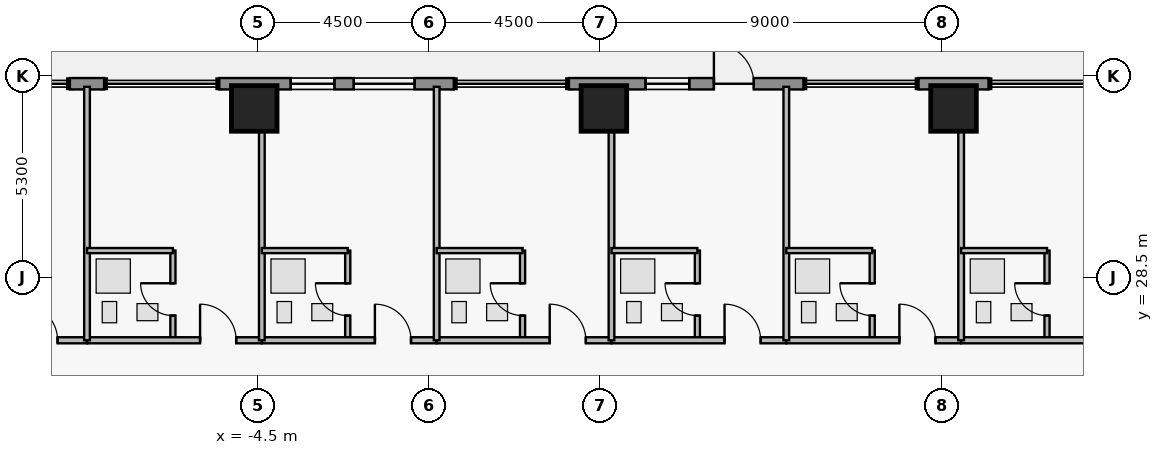
"""IFC4 building model, lengths in metres.
Left out: names, types, materials, properties, quantities, classifications, styles, units other than length and angle.
Written with IfcOpenShell. Run it as: python <this file> out.ifc"""

import sys

from ifc_helpers import new_model, si_unit, direction, frame, frame_2d, origin, origin_2d, place, context, subcontext, project, spatial, rectangle, extrude, element, fill, save


model = new_model("IFC4")
c1 = context("Model", 3, precision=1e-05, world=origin(), true_north=direction((0.0, 1.0)))
c2 = subcontext(c1, "Body", "Model", "MODEL_VIEW")
j1 = project(units=[si_unit("LENGTHUNIT", "METRE"), si_unit("PLANEANGLEUNIT", "RADIAN")], contexts=[c1])
p1 = place(None, origin())
s1 = spatial("IfcSite", under=j1, at=p1, CompositionType="ELEMENT")
p2 = place(p1, origin())
s2 = spatial("IfcBuilding", under=s1, at=p2, CompositionType="ELEMENT")
p3 = place(p2, frame((0.0, 0.0, 226.15)))
s3 = spatial("IfcBuildingStorey", under=s2, at=p3, CompositionType="ELEMENT", Elevation=226.15)
for number, where, z_axis, x_axis in (
    (1, (-4.6, 32.95, 0.0), (0.0, 0.0, 1.0), (1.0, 0.0, 0.0)),
    (2, (4.6, 32.95, 0.0), (0.0, 0.0, 1.0), (1.0, 0.0, 0.0)),
    (3, (13.8, 32.95, 0.0), (0.0, 0.0, 1.0), (1.0, 0.0, 0.0)),
):
    element("IfcColumn", number, at=place(p3, frame(where, z_axis=z_axis, x_axis=x_axis)), inside=s3, PredefinedType="COLUMN", context=c2, shape_type="SweptSolid", body=[
        extrude(rectangle(XDim=1.2, YDim=1.2, at=origin_2d()), origin(), (0.0, 0.0, 1.0), 3.75),
    ])
p4 = place(p3, frame((-9.45, 33.6, 0.0), z_axis=(0.0, 0.0, 1.0), x_axis=(1.0, 0.0, 0.0)))
e4 = element("IfcWall", 4, at=p4, inside=s3, PredefinedType="STANDARD", context=c2, shape_type="SweptSolid", body=[
    extrude(rectangle(XDim=0.9, YDim=0.3, at=frame_2d((0.45, 0.0))), origin(), (0.0, 0.0, 1.0), 3.53),
])
p5 = place(p3, frame((-5.52, 33.6, 0.0), z_axis=(0.0, 0.0, 1.0), x_axis=(1.0, 0.0, 0.0)))
e5 = element("IfcWall", 5, at=p5, inside=s3, PredefinedType="STANDARD", context=c2, shape_type="SweptSolid", body=[
    extrude(rectangle(XDim=6.17, YDim=0.3, at=frame_2d((3.085, 0.0))), origin(), (0.0, 0.0, 1.0), 3.53),
])
p6 = place(p5, frame((3.54, 0.0, 0.85)))
e6 = element("IfcOpeningElement", 6, at=p6, cuts=e5, PredefinedType="OPENING", context=c2, shape_type="SweptSolid", body=[
    extrude(rectangle(XDim=1.6, YDim=1.8, at=frame_2d((0.8, 0.9))), frame((0.0, 0.16, 0.0), z_axis=(0.0, -1.0, 0.0), x_axis=(1.0, 0.0, 0.0)), (0.0, 0.0, 1.0), 0.32),
])
p7 = place(p5, frame((1.88, 0.0, 0.95)))
e7 = element("IfcOpeningElement", 7, at=p7, cuts=e5, PredefinedType="OPENING", context=c2, shape_type="SweptSolid", body=[
    extrude(rectangle(XDim=1.15, YDim=1.55, at=frame_2d((0.575, 0.775))), frame((0.0, 0.16, 0.0), z_axis=(0.0, -1.0, 0.0), x_axis=(1.0, 0.0, 0.0)), (0.0, 0.0, 1.0), 0.32),
])
p8 = place(p3, frame((3.68, 33.6, 0.0), z_axis=(0.0, 0.0, 1.0), x_axis=(1.0, 0.0, 0.0)))
e8 = element("IfcWall", 8, at=p8, inside=s3, PredefinedType="STANDARD", context=c2, shape_type="SweptSolid", body=[
    extrude(rectangle(XDim=6.17, YDim=0.3, at=frame_2d((3.085, 0.0))), origin(), (0.0, 0.0, 1.0), 3.53),
])
p9 = place(p8, frame((3.815, 0.0, 0.0)))
e9 = element("IfcOpeningElement", 9, at=p9, cuts=e8, PredefinedType="OPENING", context=c2, shape_type="SweptSolid", body=[
    extrude(rectangle(XDim=1.05, YDim=2.2, at=frame_2d((0.525, 1.1))), frame((0.0, 0.16, 0.0), z_axis=(0.0, -1.0, 0.0), x_axis=(1.0, 0.0, 0.0)), (0.0, 0.0, 1.0), 0.32),
])
p10 = place(p8, frame((2.018, 0.0, 0.95)))
e10 = element("IfcOpeningElement", 10, at=p10, cuts=e8, PredefinedType="OPENING", context=c2, shape_type="SweptSolid", body=[
    extrude(rectangle(XDim=1.15, YDim=1.55, at=frame_2d((0.575, 0.775))), frame((0.0, 0.16, 0.0), z_axis=(0.0, -1.0, 0.0), x_axis=(1.0, 0.0, 0.0)), (0.0, 0.0, 1.0), 0.32),
])
p11 = place(p3, frame((12.88, 33.6, 0.0), z_axis=(0.0, 0.0, 1.0), x_axis=(1.0, 0.0, 0.0)))
e11 = element("IfcWall", 11, at=p11, inside=s3, PredefinedType="STANDARD", context=c2, shape_type="SweptSolid", body=[
    extrude(rectangle(XDim=1.84, YDim=0.3, at=frame_2d((0.92, 0.0))), origin(), (0.0, 0.0, 1.0), 3.53),
])
p12 = place(p3, frame((-13.8, 26.85, 0.0), z_axis=(0.0, 0.0, 1.0), x_axis=(1.0, 0.0, 0.0)))
e12 = element("IfcWall", 12, at=p12, inside=s3, PredefinedType="PARTITIONING", context=c2, shape_type="SweptSolid", body=[
    extrude(rectangle(XDim=4.8, YDim=0.16, at=frame_2d((2.4, 0.0))), origin(), (0.0, 0.0, 1.0), 3.53),
])
p13 = place(p12, frame((3.075, 0.0, 0.0)))
e13 = element("IfcOpeningElement", 13, at=p13, cuts=e12, PredefinedType="OPENING", context=c2, shape_type="SweptSolid", body=[
    extrude(rectangle(XDim=0.95, YDim=2.15, at=frame_2d((0.475, 1.075))), frame((0.0, 0.09, 0.0), z_axis=(0.0, -1.0, 0.0), x_axis=(1.0, 0.0, 0.0)), (0.0, 0.0, 1.0), 0.18),
])
p14 = place(p3, frame((-6.74, 26.85, 0.0), z_axis=(0.0, 0.0, 1.0), x_axis=(0.0, 1.0, 0.0)))
e14 = element("IfcWall", 14, at=p14, inside=s3, PredefinedType="PLUMBINGWALL", context=c2, shape_type="SweptSolid", body=[
    extrude(rectangle(XDim=2.36, YDim=0.135, at=frame_2d((1.18, 0.0))), origin(), (0.0, 0.0, 1.0), 3.53),
])
p15 = place(p14, frame((0.65, 0.0, 0.0)))
e15 = element("IfcOpeningElement", 15, at=p15, cuts=e14, PredefinedType="OPENING", context=c2, shape_type="SweptSolid", body=[
    extrude(rectangle(XDim=0.85, YDim=2.1, at=frame_2d((0.425, 1.05))), frame((0.0, 0.077, 0.0), z_axis=(0.0, -1.0, 0.0), x_axis=(1.0, 0.0, 0.0)), (0.0, 0.0, 1.0), 0.155),
])
p16 = place(p3, frame((-9.0, 26.85, 0.0), z_axis=(0.0, 0.0, 1.0), x_axis=(1.0, 0.0, 0.0)))
e16 = element("IfcWall", 16, at=p16, inside=s3, PredefinedType="PARTITIONING", context=c2, shape_type="SweptSolid", body=[
    extrude(rectangle(XDim=4.6, YDim=0.16, at=frame_2d((2.3, 0.0))), origin(), (0.0, 0.0, 1.0), 3.53),
])
p17 = place(p16, frame((2.975, 0.0, 0.0)))
e17 = element("IfcOpeningElement", 17, at=p17, cuts=e16, PredefinedType="OPENING", context=c2, shape_type="SweptSolid", body=[
    extrude(rectangle(XDim=0.95, YDim=2.15, at=frame_2d((0.475, 1.075))), frame((0.0, 0.09, 0.0), z_axis=(0.0, -1.0, 0.0), x_axis=(1.0, 0.0, 0.0)), (0.0, 0.0, 1.0), 0.18),
])
p18 = place(p3, frame((-2.14, 26.85, 0.0), z_axis=(0.0, 0.0, 1.0), x_axis=(0.0, 1.0, 0.0)))
e18 = element("IfcWall", 18, at=p18, inside=s3, PredefinedType="PLUMBINGWALL", context=c2, shape_type="SweptSolid", body=[
    extrude(rectangle(XDim=2.36, YDim=0.135, at=frame_2d((1.18, 0.0))), origin(), (0.0, 0.0, 1.0), 3.53),
])
p19 = place(p18, frame((0.65, 0.0, 0.0)))
e19 = element("IfcOpeningElement", 19, at=p19, cuts=e18, PredefinedType="OPENING", context=c2, shape_type="SweptSolid", body=[
    extrude(rectangle(XDim=0.85, YDim=2.1, at=frame_2d((0.425, 1.05))), frame((0.0, 0.077, 0.0), z_axis=(0.0, -1.0, 0.0), x_axis=(1.0, 0.0, 0.0)), (0.0, 0.0, 1.0), 0.155),
])
p20 = place(p3, frame((-4.4, 26.85, 0.0), z_axis=(0.0, 0.0, 1.0), x_axis=(1.0, 0.0, 0.0)))
e20 = element("IfcWall", 20, at=p20, inside=s3, PredefinedType="PARTITIONING", context=c2, shape_type="SweptSolid", body=[
    extrude(rectangle(XDim=4.6, YDim=0.16, at=frame_2d((2.3, 0.0))), origin(), (0.0, 0.0, 1.0), 3.53),
])
p21 = place(p20, frame((2.975, 0.0, 0.0)))
e21 = element("IfcOpeningElement", 21, at=p21, cuts=e20, PredefinedType="OPENING", context=c2, shape_type="SweptSolid", body=[
    extrude(rectangle(XDim=0.95, YDim=2.15, at=frame_2d((0.475, 1.075))), frame((0.0, 0.09, 0.0), z_axis=(0.0, -1.0, 0.0), x_axis=(1.0, 0.0, 0.0)), (0.0, 0.0, 1.0), 0.18),
])
p22 = place(p3, frame((2.46, 26.85, 0.0), z_axis=(0.0, 0.0, 1.0), x_axis=(0.0, 1.0, 0.0)))
e22 = element("IfcWall", 22, at=p22, inside=s3, PredefinedType="PLUMBINGWALL", context=c2, shape_type="SweptSolid", body=[
    extrude(rectangle(XDim=2.36, YDim=0.135, at=frame_2d((1.18, 0.0))), origin(), (0.0, 0.0, 1.0), 3.53),
])
p23 = place(p22, frame((0.65, 0.0, 0.0)))
e23 = element("IfcOpeningElement", 23, at=p23, cuts=e22, PredefinedType="OPENING", context=c2, shape_type="SweptSolid", body=[
    extrude(rectangle(XDim=0.85, YDim=2.1, at=frame_2d((0.425, 1.05))), frame((0.0, 0.077, 0.0), z_axis=(0.0, -1.0, 0.0), x_axis=(1.0, 0.0, 0.0)), (0.0, 0.0, 1.0), 0.155),
])
p24 = place(p3, frame((0.2, 26.85, 0.0), z_axis=(0.0, 0.0, 1.0), x_axis=(1.0, 0.0, 0.0)))
e24 = element("IfcWall", 24, at=p24, inside=s3, PredefinedType="PARTITIONING", context=c2, shape_type="SweptSolid", body=[
    extrude(rectangle(XDim=4.6, YDim=0.16, at=frame_2d((2.3, 0.0))), origin(), (0.0, 0.0, 1.0), 3.53),
])
p25 = place(p24, frame((2.975, 0.0, 0.0)))
e25 = element("IfcOpeningElement", 25, at=p25, cuts=e24, PredefinedType="OPENING", context=c2, shape_type="SweptSolid", body=[
    extrude(rectangle(XDim=0.95, YDim=2.15, at=frame_2d((0.475, 1.075))), frame((0.0, 0.09, 0.0), z_axis=(0.0, -1.0, 0.0), x_axis=(1.0, 0.0, 0.0)), (0.0, 0.0, 1.0), 0.18),
])
p26 = place(p3, frame((7.06, 26.85, 0.0), z_axis=(0.0, 0.0, 1.0), x_axis=(0.0, 1.0, 0.0)))
e26 = element("IfcWall", 26, at=p26, inside=s3, PredefinedType="PLUMBINGWALL", context=c2, shape_type="SweptSolid", body=[
    extrude(rectangle(XDim=2.36, YDim=0.135, at=frame_2d((1.18, 0.0))), origin(), (0.0, 0.0, 1.0), 3.53),
])
p27 = place(p26, frame((0.65, 0.0, 0.0)))
e27 = element("IfcOpeningElement", 27, at=p27, cuts=e26, PredefinedType="OPENING", context=c2, shape_type="SweptSolid", body=[
    extrude(rectangle(XDim=0.85, YDim=2.1, at=frame_2d((0.425, 1.05))), frame((0.0, 0.077, 0.0), z_axis=(0.0, -1.0, 0.0), x_axis=(1.0, 0.0, 0.0)), (0.0, 0.0, 1.0), 0.155),
])
p28 = place(p3, frame((4.8, 26.85, 0.0), z_axis=(0.0, 0.0, 1.0), x_axis=(1.0, 0.0, 0.0)))
e28 = element("IfcWall", 28, at=p28, inside=s3, PredefinedType="PARTITIONING", context=c2, shape_type="SweptSolid", body=[
    extrude(rectangle(XDim=4.6, YDim=0.16, at=frame_2d((2.3, 0.0))), origin(), (0.0, 0.0, 1.0), 3.53),
])
p29 = place(p28, frame((2.975, 0.0, 0.0)))
e29 = element("IfcOpeningElement", 29, at=p29, cuts=e28, PredefinedType="OPENING", context=c2, shape_type="SweptSolid", body=[
    extrude(rectangle(XDim=0.95, YDim=2.15, at=frame_2d((0.475, 1.075))), frame((0.0, 0.09, 0.0), z_axis=(0.0, -1.0, 0.0), x_axis=(1.0, 0.0, 0.0)), (0.0, 0.0, 1.0), 0.18),
])
p30 = place(p3, frame((11.66, 26.85, 0.0), z_axis=(0.0, 0.0, 1.0), x_axis=(0.0, 1.0, 0.0)))
e30 = element("IfcWall", 30, at=p30, inside=s3, PredefinedType="PLUMBINGWALL", context=c2, shape_type="SweptSolid", body=[
    extrude(rectangle(XDim=2.36, YDim=0.135, at=frame_2d((1.18, 0.0))), origin(), (0.0, 0.0, 1.0), 3.53),
])
p31 = place(p30, frame((0.65, 0.0, 0.0)))
e31 = element("IfcOpeningElement", 31, at=p31, cuts=e30, PredefinedType="OPENING", context=c2, shape_type="SweptSolid", body=[
    extrude(rectangle(XDim=0.85, YDim=2.1, at=frame_2d((0.425, 1.05))), frame((0.0, 0.077, 0.0), z_axis=(0.0, -1.0, 0.0), x_axis=(1.0, 0.0, 0.0)), (0.0, 0.0, 1.0), 0.155),
])
p32 = place(p3, frame((9.4, 26.85, 0.0), z_axis=(0.0, 0.0, 1.0), x_axis=(1.0, 0.0, 0.0)))
e32 = element("IfcWall", 32, at=p32, inside=s3, PredefinedType="PARTITIONING", context=c2, shape_type="SweptSolid", body=[
    extrude(rectangle(XDim=4.6, YDim=0.16, at=frame_2d((2.3, 0.0))), origin(), (0.0, 0.0, 1.0), 3.53),
])
p33 = place(p32, frame((2.975, 0.0, 0.0)))
e33 = element("IfcOpeningElement", 33, at=p33, cuts=e32, PredefinedType="OPENING", context=c2, shape_type="SweptSolid", body=[
    extrude(rectangle(XDim=0.95, YDim=2.15, at=frame_2d((0.475, 1.075))), frame((0.0, 0.09, 0.0), z_axis=(0.0, -1.0, 0.0), x_axis=(1.0, 0.0, 0.0)), (0.0, 0.0, 1.0), 0.18),
])
p34 = place(p3, frame((16.26, 26.85, 0.0), z_axis=(0.0, 0.0, 1.0), x_axis=(0.0, 1.0, 0.0)))
e34 = element("IfcWall", 34, at=p34, inside=s3, PredefinedType="PLUMBINGWALL", context=c2, shape_type="SweptSolid", body=[
    extrude(rectangle(XDim=2.36, YDim=0.135, at=frame_2d((1.18, 0.0))), origin(), (0.0, 0.0, 1.0), 3.53),
])
p35 = place(p34, frame((0.65, 0.0, 0.0)))
e35 = element("IfcOpeningElement", 35, at=p35, cuts=e34, PredefinedType="OPENING", context=c2, shape_type="SweptSolid", body=[
    extrude(rectangle(XDim=0.85, YDim=2.1, at=frame_2d((0.425, 1.05))), frame((0.0, 0.077, 0.0), z_axis=(0.0, -1.0, 0.0), x_axis=(1.0, 0.0, 0.0)), (0.0, 0.0, 1.0), 0.155),
])
p36 = place(p3, frame((14.0, 26.85, 0.0), z_axis=(0.0, 0.0, 1.0), x_axis=(1.0, 0.0, 0.0)))
e36 = element("IfcWall", 36, at=p36, inside=s3, PredefinedType="PARTITIONING", context=c2, shape_type="SweptSolid", body=[
    extrude(rectangle(XDim=8.04, YDim=0.16, at=frame_2d((4.02, 0.0))), origin(), (0.0, 0.0, 1.0), 3.53),
])
p37 = place(p36, frame((4.67, 0.0, 0.0)))
e37 = element("IfcOpeningElement", 37, at=p37, cuts=e36, PredefinedType="OPENING", context=c2, shape_type="SweptSolid", body=[
    extrude(rectangle(XDim=1.0, YDim=2.15, at=frame_2d((0.5, 1.075))), frame((0.0, 0.09, 0.0), z_axis=(0.0, -1.0, 0.0), x_axis=(1.0, 0.0, 0.0)), (0.0, 0.0, 1.0), 0.18),
])
p38 = place(p3, frame((-9.0, 26.85, 0.0), z_axis=(0.0, 0.0, 1.0), x_axis=(0.0, 1.0, 0.0)))
e38 = element("IfcWall", 38, at=p38, inside=s3, PredefinedType="PARTITIONING", context=c2, shape_type="SweptSolid", body=[
    extrude(rectangle(XDim=6.67, YDim=0.15, at=frame_2d((3.335, 0.0))), origin(), (0.0, 0.0, 1.0), 3.53),
])
p39 = place(p3, frame((-9.0, 29.21, 0.0), z_axis=(0.0, 0.0, 1.0), x_axis=(1.0, 0.0, 0.0)))
e39 = element("IfcWall", 39, at=p39, inside=s3, PredefinedType="PLUMBINGWALL", context=c2, shape_type="SweptSolid", body=[
    extrude(rectangle(XDim=2.26, YDim=0.135, at=frame_2d((1.13, 0.0))), origin(), (0.0, 0.0, 1.0), 3.53),
])
p40 = place(p3, frame((-4.4, 26.85, 0.0), z_axis=(0.0, 0.0, 1.0), x_axis=(0.0, 1.0, 0.0)))
e40 = element("IfcWall", 40, at=p40, inside=s3, PredefinedType="PARTITIONING", context=c2, shape_type="SweptSolid", body=[
    extrude(rectangle(XDim=6.67, YDim=0.15, at=frame_2d((3.335, 0.0))), origin(), (0.0, 0.0, 1.0), 2.519),
])
p41 = place(p3, frame((-4.4, 29.21, 0.0), z_axis=(0.0, 0.0, 1.0), x_axis=(1.0, 0.0, 0.0)))
e41 = element("IfcWall", 41, at=p41, inside=s3, PredefinedType="PLUMBINGWALL", context=c2, shape_type="SweptSolid", body=[
    extrude(rectangle(XDim=2.26, YDim=0.135, at=frame_2d((1.13, 0.0))), origin(), (0.0, 0.0, 1.0), 3.53),
])
p42 = place(p3, frame((0.2, 26.85, 0.0), z_axis=(0.0, 0.0, 1.0), x_axis=(0.0, 1.0, 0.0)))
e42 = element("IfcWall", 42, at=p42, inside=s3, PredefinedType="PARTITIONING", context=c2, shape_type="SweptSolid", body=[
    extrude(rectangle(XDim=6.67, YDim=0.15, at=frame_2d((3.335, 0.0))), origin(), (0.0, 0.0, 1.0), 3.53),
])
p43 = place(p3, frame((0.2, 29.21, 0.0), z_axis=(0.0, 0.0, 1.0), x_axis=(1.0, 0.0, 0.0)))
e43 = element("IfcWall", 43, at=p43, inside=s3, PredefinedType="PLUMBINGWALL", context=c2, shape_type="SweptSolid", body=[
    extrude(rectangle(XDim=2.26, YDim=0.135, at=frame_2d((1.13, 0.0))), origin(), (0.0, 0.0, 1.0), 3.53),
])
p44 = place(p3, frame((4.8, 26.85, 0.0), z_axis=(0.0, 0.0, 1.0), x_axis=(0.0, 1.0, 0.0)))
e44 = element("IfcWall", 44, at=p44, inside=s3, PredefinedType="PARTITIONING", context=c2, shape_type="SweptSolid", body=[
    extrude(rectangle(XDim=6.67, YDim=0.15, at=frame_2d((3.335, 0.0))), origin(), (0.0, 0.0, 1.0), 2.519),
])
p45 = place(p3, frame((4.8, 29.21, 0.0), z_axis=(0.0, 0.0, 1.0), x_axis=(1.0, 0.0, 0.0)))
e45 = element("IfcWall", 45, at=p45, inside=s3, PredefinedType="PLUMBINGWALL", context=c2, shape_type="SweptSolid", body=[
    extrude(rectangle(XDim=2.26, YDim=0.135, at=frame_2d((1.13, 0.0))), origin(), (0.0, 0.0, 1.0), 3.53),
])
p46 = place(p3, frame((9.4, 26.85, 0.0), z_axis=(0.0, 0.0, 1.0), x_axis=(0.0, 1.0, 0.0)))
e46 = element("IfcWall", 46, at=p46, inside=s3, PredefinedType="PARTITIONING", context=c2, shape_type="SweptSolid", body=[
    extrude(rectangle(XDim=6.67, YDim=0.15, at=frame_2d((3.335, 0.0))), origin(), (0.0, 0.0, 1.0), 3.53),
])
p47 = place(p3, frame((9.4, 29.21, 0.0), z_axis=(0.0, 0.0, 1.0), x_axis=(1.0, 0.0, 0.0)))
e47 = element("IfcWall", 47, at=p47, inside=s3, PredefinedType="PLUMBINGWALL", context=c2, shape_type="SweptSolid", body=[
    extrude(rectangle(XDim=2.26, YDim=0.135, at=frame_2d((1.13, 0.0))), origin(), (0.0, 0.0, 1.0), 3.53),
])
p48 = place(p3, frame((14.0, 26.85, 0.0), z_axis=(0.0, 0.0, 1.0), x_axis=(0.0, 1.0, 0.0)))
e48 = element("IfcWall", 48, at=p48, inside=s3, PredefinedType="PARTITIONING", context=c2, shape_type="SweptSolid", body=[
    extrude(rectangle(XDim=6.67, YDim=0.15, at=frame_2d((3.335, 0.0))), origin(), (0.0, 0.0, 1.0), 2.519),
])
p49 = place(p3, frame((14.0, 29.21, 0.0), z_axis=(0.0, 0.0, 1.0), x_axis=(1.0, 0.0, 0.0)))
e49 = element("IfcWall", 49, at=p49, inside=s3, PredefinedType="PLUMBINGWALL", context=c2, shape_type="SweptSolid", body=[
    extrude(rectangle(XDim=2.26, YDim=0.135, at=frame_2d((1.13, 0.0))), origin(), (0.0, 0.0, 1.0), 3.53),
])
p50 = place(p6, origin())
e50 = element("IfcWindow", 50, at=p50, inside=s3, PartitioningType="SINGLE_PANEL", PredefinedType="WINDOW", context=c2, shape_type="SweptSolid", body=[
    extrude(rectangle(XDim=1.6, YDim=1.8, at=frame_2d((0.8, 0.9))), frame((0.0, 0.03, 0.0), z_axis=(0.0, -1.0, 0.0), x_axis=(1.0, 0.0, 0.0)), (0.0, 0.0, 1.0), 0.06),
])
fill(e6, e50)
p51 = place(p7, origin())
e51 = element("IfcWindow", 51, at=p51, inside=s3, PartitioningType="SINGLE_PANEL", PredefinedType="WINDOW", context=c2, shape_type="SweptSolid", body=[
    extrude(rectangle(XDim=1.15, YDim=1.55, at=frame_2d((0.575, 0.775))), frame((0.0, 0.03, 0.0), z_axis=(0.0, -1.0, 0.0), x_axis=(1.0, 0.0, 0.0)), (0.0, 0.0, 1.0), 0.06),
])
fill(e7, e51)
p52 = place(p9, origin())
e52 = element("IfcDoor", 52, at=p52, inside=s3, OperationType="SINGLE_SWING_LEFT", PredefinedType="DOOR", context=c2, shape_type="SweptSolid", body=[
    extrude(rectangle(XDim=1.05, YDim=2.2, at=frame_2d((0.525, 1.1))), frame((0.0, 0.025, 0.0), z_axis=(0.0, -1.0, 0.0), x_axis=(1.0, 0.0, 0.0)), (0.0, 0.0, 1.0), 0.05),
])
fill(e9, e52)
p53 = place(p10, origin())
e53 = element("IfcWindow", 53, at=p53, inside=s3, PartitioningType="SINGLE_PANEL", PredefinedType="WINDOW", context=c2, shape_type="SweptSolid", body=[
    extrude(rectangle(XDim=1.15, YDim=1.55, at=frame_2d((0.575, 0.775))), frame((0.0, 0.03, 0.0), z_axis=(0.0, -1.0, 0.0), x_axis=(1.0, 0.0, 0.0)), (0.0, 0.0, 1.0), 0.06),
])
fill(e10, e53)
p54 = place(p13, origin())
e54 = element("IfcDoor", 54, at=p54, inside=s3, OperationType="SINGLE_SWING_LEFT", PredefinedType="DOOR", context=c2, shape_type="SweptSolid", body=[
    extrude(rectangle(XDim=0.95, YDim=2.15, at=frame_2d((0.475, 1.075))), frame((0.0, 0.025, 0.0), z_axis=(0.0, -1.0, 0.0), x_axis=(1.0, 0.0, 0.0)), (0.0, 0.0, 1.0), 0.05),
])
fill(e13, e54)
p55 = place(p15, origin())
e55 = element("IfcDoor", 55, at=p55, inside=s3, OperationType="SINGLE_SWING_RIGHT", PredefinedType="DOOR", context=c2, shape_type="SweptSolid", body=[
    extrude(rectangle(XDim=0.85, YDim=2.1, at=frame_2d((0.425, 1.05))), frame((0.0, 0.025, 0.0), z_axis=(0.0, -1.0, 0.0), x_axis=(1.0, 0.0, 0.0)), (0.0, 0.0, 1.0), 0.05),
])
fill(e15, e55)
p56 = place(p17, origin())
e56 = element("IfcDoor", 56, at=p56, inside=s3, OperationType="SINGLE_SWING_LEFT", PredefinedType="DOOR", context=c2, shape_type="SweptSolid", body=[
    extrude(rectangle(XDim=0.95, YDim=2.15, at=frame_2d((0.475, 1.075))), frame((0.0, 0.025, 0.0), z_axis=(0.0, -1.0, 0.0), x_axis=(1.0, 0.0, 0.0)), (0.0, 0.0, 1.0), 0.05),
])
fill(e17, e56)
p57 = place(p19, origin())
e57 = element("IfcDoor", 57, at=p57, inside=s3, OperationType="SINGLE_SWING_RIGHT", PredefinedType="DOOR", context=c2, shape_type="SweptSolid", body=[
    extrude(rectangle(XDim=0.85, YDim=2.1, at=frame_2d((0.425, 1.05))), frame((0.0, 0.025, 0.0), z_axis=(0.0, -1.0, 0.0), x_axis=(1.0, 0.0, 0.0)), (0.0, 0.0, 1.0), 0.05),
])
fill(e19, e57)
p58 = place(p21, origin())
e58 = element("IfcDoor", 58, at=p58, inside=s3, OperationType="SINGLE_SWING_LEFT", PredefinedType="DOOR", context=c2, shape_type="SweptSolid", body=[
    extrude(rectangle(XDim=0.95, YDim=2.15, at=frame_2d((0.475, 1.075))), frame((0.0, 0.025, 0.0), z_axis=(0.0, -1.0, 0.0), x_axis=(1.0, 0.0, 0.0)), (0.0, 0.0, 1.0), 0.05),
])
fill(e21, e58)
p59 = place(p23, origin())
e59 = element("IfcDoor", 59, at=p59, inside=s3, OperationType="SINGLE_SWING_RIGHT", PredefinedType="DOOR", context=c2, shape_type="SweptSolid", body=[
    extrude(rectangle(XDim=0.85, YDim=2.1, at=frame_2d((0.425, 1.05))), frame((0.0, 0.025, 0.0), z_axis=(0.0, -1.0, 0.0), x_axis=(1.0, 0.0, 0.0)), (0.0, 0.0, 1.0), 0.05),
])
fill(e23, e59)
p60 = place(p25, origin())
e60 = element("IfcDoor", 60, at=p60, inside=s3, OperationType="SINGLE_SWING_LEFT", PredefinedType="DOOR", context=c2, shape_type="SweptSolid", body=[
    extrude(rectangle(XDim=0.95, YDim=2.15, at=frame_2d((0.475, 1.075))), frame((0.0, 0.025, 0.0), z_axis=(0.0, -1.0, 0.0), x_axis=(1.0, 0.0, 0.0)), (0.0, 0.0, 1.0), 0.05),
])
fill(e25, e60)
p61 = place(p27, origin())
e61 = element("IfcDoor", 61, at=p61, inside=s3, OperationType="SINGLE_SWING_RIGHT", PredefinedType="DOOR", context=c2, shape_type="SweptSolid", body=[
    extrude(rectangle(XDim=0.85, YDim=2.1, at=frame_2d((0.425, 1.05))), frame((0.0, 0.025, 0.0), z_axis=(0.0, -1.0, 0.0), x_axis=(1.0, 0.0, 0.0)), (0.0, 0.0, 1.0), 0.05),
])
fill(e27, e61)
p62 = place(p29, origin())
e62 = element("IfcDoor", 62, at=p62, inside=s3, OperationType="SINGLE_SWING_LEFT", PredefinedType="DOOR", context=c2, shape_type="SweptSolid", body=[
    extrude(rectangle(XDim=0.95, YDim=2.15, at=frame_2d((0.475, 1.075))), frame((0.0, 0.025, 0.0), z_axis=(0.0, -1.0, 0.0), x_axis=(1.0, 0.0, 0.0)), (0.0, 0.0, 1.0), 0.05),
])
fill(e29, e62)
p63 = place(p31, origin())
e63 = element("IfcDoor", 63, at=p63, inside=s3, OperationType="SINGLE_SWING_RIGHT", PredefinedType="DOOR", context=c2, shape_type="SweptSolid", body=[
    extrude(rectangle(XDim=0.85, YDim=2.1, at=frame_2d((0.425, 1.05))), frame((0.0, 0.025, 0.0), z_axis=(0.0, -1.0, 0.0), x_axis=(1.0, 0.0, 0.0)), (0.0, 0.0, 1.0), 0.05),
])
fill(e31, e63)
p64 = place(p33, origin())
e64 = element("IfcDoor", 64, at=p64, inside=s3, OperationType="SINGLE_SWING_LEFT", PredefinedType="DOOR", context=c2, shape_type="SweptSolid", body=[
    extrude(rectangle(XDim=0.95, YDim=2.15, at=frame_2d((0.475, 1.075))), frame((0.0, 0.025, 0.0), z_axis=(0.0, -1.0, 0.0), x_axis=(1.0, 0.0, 0.0)), (0.0, 0.0, 1.0), 0.05),
])
fill(e33, e64)
p65 = place(p35, origin())
e65 = element("IfcDoor", 65, at=p65, inside=s3, OperationType="SINGLE_SWING_RIGHT", PredefinedType="DOOR", context=c2, shape_type="SweptSolid", body=[
    extrude(rectangle(XDim=0.85, YDim=2.1, at=frame_2d((0.425, 1.05))), frame((0.0, 0.025, 0.0), z_axis=(0.0, -1.0, 0.0), x_axis=(1.0, 0.0, 0.0)), (0.0, 0.0, 1.0), 0.05),
])
fill(e35, e65)
save(model, sys.argv[1])
